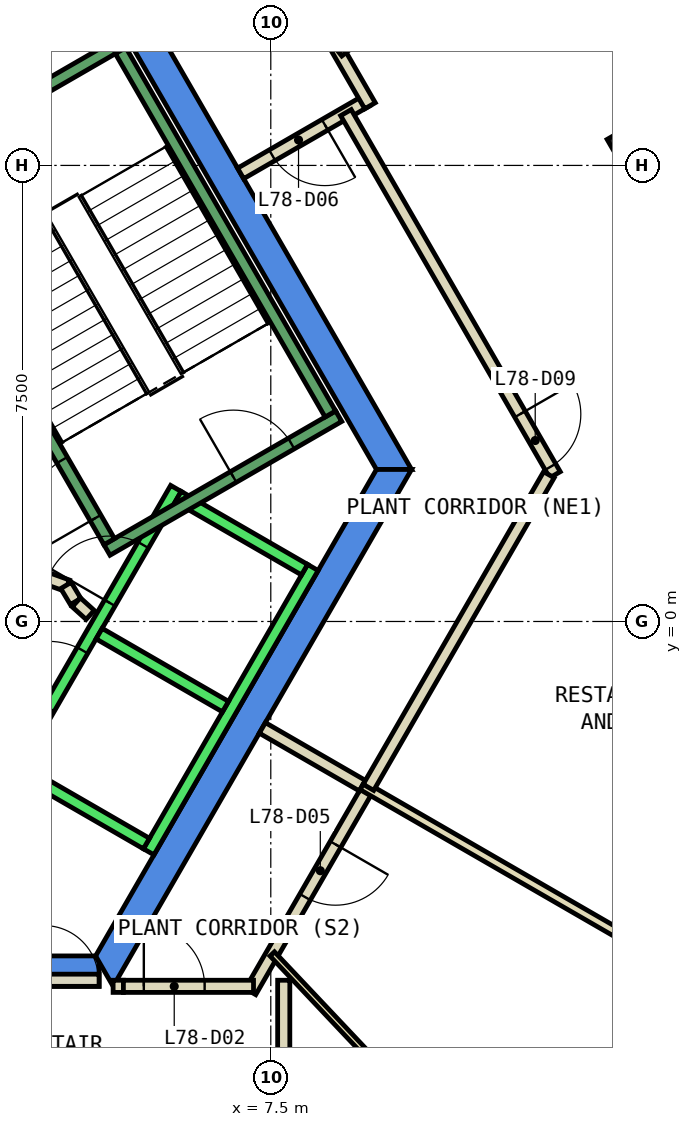
"""IFC4 building model, lengths in metres.
Left out: names, types, materials, properties, quantities, classifications, styles, units other than length and angle.
Written with IfcOpenShell. Run it as: python <this file> out.ifc"""

import sys

from ifc_helpers import new_model, si_unit, direction, frame, frame_2d, origin, origin_2d, place, context, subcontext, project, spatial, polyline, rectangle, outline, extrude, element, fill, save


model = new_model("IFC4")
c1 = context("Model", 3, precision=1e-05, world=origin(), true_north=direction((0.0, 1.0)))
c2 = subcontext(c1, "Body", "Model", "MODEL_VIEW")
j1 = project(units=[si_unit("LENGTHUNIT", "METRE"), si_unit("PLANEANGLEUNIT", "RADIAN")], contexts=[c1])
p1 = place(None, origin())
s1 = spatial("IfcSite", under=j1, at=p1, CompositionType="ELEMENT")
p2 = place(p1, origin())
s2 = spatial("IfcBuilding", under=s1, at=p2, CompositionType="ELEMENT")
p3 = place(p2, frame((0.0, 0.0, 331.4)))
s3 = spatial("IfcBuildingStorey", under=s2, at=p3, CompositionType="ELEMENT", Elevation=331.4)
p4 = place(p3, frame((13.51, 7.8, 0.0), z_axis=(0.0, 0.0, 1.0), x_axis=(-0.5, 0.866025403784, 0.0)))
e1 = element("IfcColumn", 1, at=p4, inside=s3, PredefinedType="COLUMN", context=c2, shape_type="SweptSolid", body=[
    extrude(rectangle(XDim=0.7, YDim=0.7, at=origin_2d()), origin(), (0.0, 0.0, 1.0), 4.15),
])
p5 = place(p3, frame((0.0, 0.0, -0.45)))
e2 = element("IfcWall", 2, at=p5, inside=s3, PredefinedType="SHEAR", context=c2, shape_type="SweptSolid", body=[
    extrude(outline(polyline([(5.486, 9.998), (5.053, 9.748), (9.238, 2.5), (9.815, 2.5), (5.486, 9.998)])), origin(), (0.0, 0.0, 1.0), 4.6),
])
p6 = place(p3, frame((0.0, 0.0, 3.6)))
e3 = element("IfcWall", 3, at=p6, inside=s3, PredefinedType="SHEAR", context=c2, shape_type="SweptSolid", body=[
    extrude(outline(polyline([(4.676, -6.0), (4.676, -5.6), (4.619, -5.5), (3.75, -5.5), (3.75, -6.0), (4.676, -6.0)])), origin(), (0.0, 0.0, 1.0), 0.55),
])
p7 = place(p3, frame((0.0, 0.0, -0.45)))
e4 = element("IfcWall", 4, at=p7, inside=s3, PredefinedType="SHEAR", context=c2, shape_type="SweptSolid", body=[
    extrude(outline(polyline([(4.907, -6.0), (9.815, 2.5), (9.238, 2.5), (4.619, -5.5), (4.907, -6.0)])), origin(), (0.0, 0.0, 1.0), 4.6),
])
p8 = place(p3, frame((13.905, 8.604, 0.0), z_axis=(0.0, 0.0, 1.0), x_axis=(-0.509697735304, 0.86035354281, 0.0)))
e5 = element("IfcWall", 5, at=p8, inside=s3, PredefinedType="STANDARD", context=c2, shape_type="SweptSolid", body=[
    extrude(rectangle(XDim=7.098, YDim=0.3, at=frame_2d((3.549, 0.0))), origin(), (0.0, 0.0, 1.0), 4.15),
])
p9 = place(p8, frame((0.575, 0.0, 0.9)))
e6 = element("IfcOpeningElement", 6, at=p9, cuts=e5, PredefinedType="OPENING", context=c2, shape_type="SweptSolid", body=[
    extrude(rectangle(XDim=2.4, YDim=3.0, at=frame_2d((1.2, 1.5))), frame((0.0, 0.16, 0.0), z_axis=(0.0, -1.0, 0.0), x_axis=(1.0, 0.0, 0.0)), (0.0, 0.0, 1.0), 0.32),
])
p10 = place(p8, frame((4.124, 0.0, 0.9)))
e7 = element("IfcOpeningElement", 7, at=p10, cuts=e5, PredefinedType="OPENING", context=c2, shape_type="SweptSolid", body=[
    extrude(rectangle(XDim=2.4, YDim=3.0, at=frame_2d((1.2, 1.5))), frame((0.0, 0.16, 0.0), z_axis=(0.0, -1.0, 0.0), x_axis=(1.0, 0.0, 0.0)), (0.0, 0.0, 1.0), 0.32),
])
p11 = place(p3, frame((3.838, 0.702, 0.0), z_axis=(0.0, 0.0, 1.0), x_axis=(0.941035081519, -0.338308993895, 0.0)))
e8 = element("IfcWall", 8, at=p11, inside=s3, PredefinedType="PARTITIONING", context=c2, shape_type="SweptSolid", body=[
    extrude(rectangle(XDim=0.337, YDim=0.2, at=frame_2d((0.168, 0.0))), origin(), (0.0, 0.0, 1.0), 4.15),
])
p12 = place(p3, frame((4.132, 0.593, 0.0), z_axis=(0.0, 0.0, 1.0), x_axis=(0.513561617048, -0.858052717201, 0.0)))
e9 = element("IfcWall", 9, at=p12, inside=s3, PredefinedType="PARTITIONING", context=c2, shape_type="SweptSolid", body=[
    extrude(rectangle(XDim=0.308, YDim=0.2, at=frame_2d((0.154, 0.0))), origin(), (0.0, 0.0, 1.0), 4.15),
])
p13 = place(p3, frame((4.301, 0.315, 0.0), z_axis=(0.0, 0.0, 1.0), x_axis=(0.741798017506, -0.670623367639, 0.0)))
e10 = element("IfcWall", 10, at=p13, inside=s3, PredefinedType="PARTITIONING", context=c2, shape_type="SweptSolid", body=[
    extrude(rectangle(XDim=0.309, YDim=0.2, at=frame_2d((0.154, 0.0))), origin(), (0.0, 0.0, 1.0), 4.15),
])
p14 = place(p3, frame((4.907, -6.0, 0.0), z_axis=(0.0, 0.0, 1.0), x_axis=(1.0, 0.0, 0.0)))
e11 = element("IfcWall", 11, at=p14, inside=s3, PredefinedType="PARTITIONING", context=c2, shape_type="SweptSolid", body=[
    extrude(rectangle(XDim=0.169, YDim=0.2, at=frame_2d((0.084, 0.0))), origin(), (0.0, 0.0, 1.0), 2.4),
])
p15 = place(p3, frame((7.713, -5.9, 0.0), z_axis=(0.0, 0.0, 1.0), x_axis=(0.0, -1.0, 0.0)))
e12 = element("IfcWall", 12, at=p15, inside=s3, PredefinedType="PARTITIONING", context=c2, shape_type="SweptSolid", body=[
    extrude(rectangle(XDim=2.4, YDim=0.2, at=frame_2d((1.2, 0.0))), origin(), (0.0, 0.0, 1.0), 4.15),
])
p16 = place(p3, frame((9.106, -2.728, 0.0), z_axis=(0.0, 0.0, 1.0), x_axis=(-0.500132879116, -0.865948672398, 0.0)))
e13 = element("IfcWall", 13, at=p16, inside=s3, PredefinedType="PARTITIONING", context=c2, shape_type="SweptSolid", body=[
    extrude(rectangle(XDim=3.879, YDim=0.2, at=frame_2d((1.939, 0.0))), origin(), (0.0, 0.0, 1.0), 4.15),
])
p17 = place(p16, frame((1.083, 0.0, 0.0)))
e14 = element("IfcOpeningElement", 14, at=p17, cuts=e13, PredefinedType="OPENING", context=c2, shape_type="SweptSolid", body=[
    extrude(rectangle(XDim=1.0, YDim=2.1, at=frame_2d((0.5, 1.05))), frame((0.0, 0.11, 0.0), z_axis=(0.0, -1.0, 0.0), x_axis=(1.0, 0.0, 0.0)), (0.0, 0.0, 1.0), 0.22),
])
p18 = place(p3, frame((7.361, -1.75, 0.0), z_axis=(0.0, 0.0, 1.0), x_axis=(0.865980106173, -0.500078449558, 0.0)))
e15 = element("IfcWall", 15, at=p18, inside=s3, PredefinedType="PARTITIONING", context=c2, shape_type="SweptSolid", body=[
    extrude(rectangle(XDim=1.9, YDim=0.2, at=frame_2d((0.95, 0.0))), origin(), (0.0, 0.0, 1.0), 4.15),
])
p19 = place(p3, frame((7.524, -5.467, 0.0), z_axis=(0.0, 0.0, 1.0), x_axis=(0.686666158826, -0.726972892427, 0.0)))
e16 = element("IfcWall", 16, at=p19, inside=s3, PredefinedType="PARTITIONING", context=c2, shape_type="SweptSolid", body=[
    extrude(rectangle(XDim=13.622, YDim=0.1, at=frame_2d((6.811, 0.0))), origin(), (0.0, 0.0, 1.0), 4.15),
])
p20 = place(p3, frame((9.006, -2.7, 0.0), z_axis=(0.0, 0.0, 1.0), x_axis=(0.865999449672, -0.500044951147, 0.0)))
e17 = element("IfcWall", 17, at=p20, inside=s3, PredefinedType="PARTITIONING", context=c2, shape_type="SweptSolid", body=[
    extrude(rectangle(XDim=14.635, YDim=0.15, at=frame_2d((7.317, 0.0))), origin(), (0.0, 0.0, 1.0), 4.15),
])
p21 = place(p3, frame((9.082, 8.568, 0.0), z_axis=(0.0, 0.0, 1.0), x_axis=(-0.865955154139, -0.50012165622, 0.0)))
e18 = element("IfcWall", 18, at=p21, inside=s3, PredefinedType="PARTITIONING", context=c2, shape_type="SweptSolid", body=[
    extrude(rectangle(XDim=2.4, YDim=0.2, at=frame_2d((1.2, 0.0))), origin(), (0.0, 0.0, 1.0), 4.15),
])
p22 = place(p21, frame((0.8, 0.0, 0.0)))
e19 = element("IfcOpeningElement", 19, at=p22, cuts=e18, PredefinedType="OPENING", context=c2, shape_type="SweptSolid", body=[
    extrude(rectangle(XDim=1.0, YDim=2.1, at=frame_2d((0.5, 1.05))), frame((0.0, 0.11, 0.0), z_axis=(0.0, -1.0, 0.0), x_axis=(1.0, 0.0, 0.0)), (0.0, 0.0, 1.0), 0.22),
])
p23 = place(p3, frame((5.532, 14.717, 0.0), z_axis=(0.0, 0.0, 1.0), x_axis=(0.499968011863, -0.866043871356, 0.0)))
e20 = element("IfcWall", 20, at=p23, inside=s3, PredefinedType="PARTITIONING", context=c2, shape_type="SweptSolid", body=[
    extrude(rectangle(XDim=7.201, YDim=0.2, at=frame_2d((3.6, 0.0))), origin(), (0.0, 0.0, 1.0), 4.15),
])
p24 = place(p23, frame((2.68, 0.0, 0.0)))
e21 = element("IfcOpeningElement", 21, at=p24, cuts=e20, PredefinedType="OPENING", context=c2, shape_type="SweptSolid", body=[
    extrude(rectangle(XDim=1.0, YDim=2.1, at=frame_2d((0.5, 1.05))), frame((0.0, 0.11, 0.0), z_axis=(0.0, -1.0, 0.0), x_axis=(1.0, 0.0, 0.0)), (0.0, 0.0, 1.0), 0.22),
])
p25 = place(p3, frame((8.736, 8.368, 0.0), z_axis=(0.0, 0.0, 1.0), x_axis=(0.499995994493, -0.866027716353, 0.0)))
e22 = element("IfcWall", 22, at=p25, inside=s3, PredefinedType="PARTITIONING", context=c2, shape_type="SweptSolid", body=[
    extrude(rectangle(XDim=6.876, YDim=0.2, at=frame_2d((3.438, 0.0))), origin(), (0.0, 0.0, 1.0), 4.15),
])
p26 = place(p25, frame((5.726, 0.0, 0.0)))
e23 = element("IfcOpeningElement", 23, at=p26, cuts=e22, PredefinedType="OPENING", context=c2, shape_type="SweptSolid", body=[
    extrude(rectangle(XDim=1.0, YDim=2.1, at=frame_2d((0.5, 1.05))), frame((0.0, 0.11, 0.0), z_axis=(0.0, -1.0, 0.0), x_axis=(1.0, 0.0, 0.0)), (0.0, 0.0, 1.0), 0.22),
])
p27 = place(p3, frame((12.074, 2.413, 0.0), z_axis=(0.0, 0.0, 1.0), x_axis=(-0.499974029402, -0.866040397397, 0.0)))
e24 = element("IfcWall", 24, at=p27, inside=s3, PredefinedType="PARTITIONING", context=c2, shape_type="SweptSolid", body=[
    extrude(rectangle(XDim=5.936, YDim=0.2, at=frame_2d((2.968, 0.0))), origin(), (0.0, 0.0, 1.0), 4.15),
])
p28 = place(p3, frame((11.808, 11.849, 0.0), z_axis=(0.0, 0.0, 1.0), x_axis=(-0.784103353093, -0.620630269701, 0.0)))
e25 = element("IfcWall", 25, at=p28, inside=s3, PredefinedType="PARTITIONING", context=c2, shape_type="SweptSolid", body=[
    extrude(rectangle(XDim=4.044, YDim=0.1, at=frame_2d((2.022, 0.0))), origin(), (0.0, 0.0, 1.0), 4.15),
])
p29 = place(p3, frame((3.75, -5.9, 0.0), z_axis=(0.0, 0.0, 1.0), x_axis=(1.0, 0.0, 0.0)))
e26 = element("IfcWall", 26, at=p29, inside=s3, PredefinedType="PARTITIONING", context=c2, shape_type="SweptSolid", body=[
    extrude(rectangle(XDim=0.926, YDim=0.2, at=frame_2d((0.463, 0.0))), origin(), (0.0, 0.0, 1.0), 2.4),
])
p30 = place(p29, frame((0.017, 0.0, 0.0)))
e27 = element("IfcOpeningElement", 27, at=p30, cuts=e26, PredefinedType="OPENING", context=c2, shape_type="SweptSolid", body=[
    extrude(rectangle(XDim=0.9, YDim=2.1, at=frame_2d((0.45, 1.05))), frame((0.0, 0.11, 0.0), z_axis=(0.0, -1.0, 0.0), x_axis=(1.0, 0.0, 0.0)), (0.0, 0.0, 1.0), 0.22),
])
p31 = place(p3, frame((5.076, -6.0, 0.0), z_axis=(0.0, 0.0, 1.0), x_axis=(1.0, 0.0, 0.0)))
e28 = element("IfcWall", 28, at=p31, inside=s3, PredefinedType="PARTITIONING", context=c2, shape_type="SweptSolid", body=[
    extrude(rectangle(XDim=2.14, YDim=0.2, at=frame_2d((1.07, 0.0))), origin(), (0.0, 0.0, 1.0), 4.15),
])
p32 = place(p31, frame((0.336, 0.0, 0.0)))
e29 = element("IfcOpeningElement", 29, at=p32, cuts=e28, PredefinedType="OPENING", context=c2, shape_type="SweptSolid", body=[
    extrude(rectangle(XDim=1.0, YDim=2.1, at=frame_2d((0.5, 1.05))), frame((0.0, 0.11, 0.0), z_axis=(0.0, -1.0, 0.0), x_axis=(1.0, 0.0, 0.0)), (0.0, 0.0, 1.0), 0.22),
])
p33 = place(p3, frame((3.24, -2.488, 0.0), z_axis=(0.0, 0.0, 1.0), x_axis=(0.500034260056, 0.866005622828, 0.0)))
e30 = element("IfcWall", 30, at=p33, inside=s3, PredefinedType="STANDARD", context=c2, shape_type="SweptSolid", body=[
    extrude(rectangle(XDim=5.399, YDim=0.2, at=frame_2d((2.7, 0.0))), origin(), (0.0, 0.0, 1.0), 4.15),
])
p34 = place(p33, frame((3.225, 0.0, 0.0)))
e31 = element("IfcOpeningElement", 31, at=p34, cuts=e30, PredefinedType="OPENING", context=c2, shape_type="SweptSolid", body=[
    extrude(rectangle(XDim=1.1, YDim=2.1, at=frame_2d((0.55, 1.05))), frame((0.0, 0.11, 0.0), z_axis=(0.0, -1.0, 0.0), x_axis=(1.0, 0.0, 0.0)), (0.0, 0.0, 1.0), 0.22),
])
p35 = place(p33, frame((1.225, 0.0, 0.0)))
e32 = element("IfcOpeningElement", 32, at=p35, cuts=e30, PredefinedType="OPENING", context=c2, shape_type="SweptSolid", body=[
    extrude(rectangle(XDim=1.1, YDim=2.1, at=frame_2d((0.55, 1.05))), frame((0.0, 0.11, 0.0), z_axis=(0.0, -1.0, 0.0), x_axis=(1.0, 0.0, 0.0)), (0.0, 0.0, 1.0), 0.22),
])
p36 = place(p3, frame((5.492, -3.788, 0.0), z_axis=(0.0, 0.0, 1.0), x_axis=(0.500034260056, 0.866005622828, 0.0)))
e33 = element("IfcWall", 33, at=p36, inside=s3, PredefinedType="STANDARD", context=c2, shape_type="SweptSolid", body=[
    extrude(rectangle(XDim=5.399, YDim=0.2, at=frame_2d((2.7, 0.0))), origin(), (0.0, 0.0, 1.0), 4.15),
])
p37 = place(p3, frame((3.377, -2.452, 0.0), z_axis=(0.0, 0.0, 1.0), x_axis=(0.865955154139, -0.50012165622, 0.0)))
e34 = element("IfcWall", 34, at=p37, inside=s3, PredefinedType="STANDARD", context=c2, shape_type="SweptSolid", body=[
    extrude(rectangle(XDim=2.4, YDim=0.2, at=frame_2d((1.2, 0.0))), origin(), (0.0, 0.0, 1.0), 4.15),
])
for number, where, z_axis, x_axis in (
    (35, (4.677, -0.2, 0.0), (0.0, 0.0, 1.0), (0.866, -0.5, 0.0)),
    (36, (5.977, 2.052, 0.0), (0.0, 0.0, 1.0), (0.866, -0.5, 0.0)),
):
    element("IfcWall", number, at=place(p3, frame(where, z_axis=z_axis, x_axis=x_axis)), inside=s3, PredefinedType="STANDARD", context=c2, shape_type="SweptSolid", body=[
        extrude(rectangle(XDim=2.399, YDim=0.2, at=frame_2d((1.2, 0.0))), origin(), (0.0, 0.0, 1.0), 4.15),
    ])
p38 = place(p3, frame((4.806, 1.176, 0.0), z_axis=(0.0, 0.0, 1.0), x_axis=(0.866059941101, 0.499940174841, 0.0)))
e37 = element("IfcWall", 37, at=p38, inside=s3, PredefinedType="STANDARD", context=c2, shape_type="SweptSolid", body=[
    extrude(rectangle(XDim=4.4, YDim=0.2, at=frame_2d((2.2, 0.0))), origin(), (0.0, 0.0, 1.0), 4.15),
])
p39 = place(p38, frame((2.4, 0.0, 0.0)))
e38 = element("IfcOpeningElement", 38, at=p39, cuts=e37, PredefinedType="OPENING", context=c2, shape_type="SweptSolid", body=[
    extrude(rectangle(XDim=1.1, YDim=2.2, at=frame_2d((0.55, 1.1))), frame((0.0, 0.11, 0.0), z_axis=(0.0, -1.0, 0.0), x_axis=(1.0, 0.0, 0.0)), (0.0, 0.0, 1.0), 0.22),
])
p40 = place(p3, frame((2.7, 8.158, 0.0), z_axis=(0.0, 0.0, 1.0), x_axis=(0.86611865017, 0.499838457731, 0.0)))
e39 = element("IfcWall", 39, at=p40, inside=s3, PredefinedType="STANDARD", context=c2, shape_type="SweptSolid", body=[
    extrude(rectangle(XDim=2.733, YDim=0.2, at=frame_2d((1.366, 0.0))), origin(), (0.0, 0.0, 1.0), 4.15),
])
p41 = place(p3, frame((4.843, 1.312, 0.0), z_axis=(0.0, 0.0, 1.0), x_axis=(-0.499963383562, 0.866046543262, 0.0)))
e40 = element("IfcWall", 40, at=p41, inside=s3, PredefinedType="STANDARD", context=c2, shape_type="SweptSolid", body=[
    extrude(rectangle(XDim=6.9, YDim=0.2, at=frame_2d((3.45, 0.0))), origin(), (0.0, 0.0, 1.0), 4.15),
])
p42 = place(p41, frame((0.45, 0.0, 0.0)))
e41 = element("IfcOpeningElement", 41, at=p42, cuts=e40, PredefinedType="OPENING", context=c2, shape_type="SweptSolid", body=[
    extrude(rectangle(XDim=1.1, YDim=2.2, at=frame_2d((0.55, 1.1))), frame((0.0, 0.11, 0.0), z_axis=(0.0, -1.0, 0.0), x_axis=(1.0, 0.0, 0.0)), (0.0, 0.0, 1.0), 0.22),
])
p43 = place(p3, frame((8.48, 3.412, 0.0), z_axis=(0.0, 0.0, 1.0), x_axis=(-0.499978703459, 0.866037698999, 0.0)))
e42 = element("IfcWall", 42, at=p43, inside=s3, PredefinedType="STANDARD", context=c2, shape_type="SweptSolid", body=[
    extrude(rectangle(XDim=6.9, YDim=0.2, at=frame_2d((3.45, 0.0))), origin(), (0.0, 0.0, 1.0), 4.15),
])
p44 = place(p9, origin())
e43 = element("IfcWindow", 43, at=p44, inside=s3, PartitioningType="SINGLE_PANEL", PredefinedType="WINDOW", context=c2, shape_type="SweptSolid", body=[
    extrude(rectangle(XDim=2.4, YDim=3.0, at=frame_2d((1.2, 1.5))), frame((0.0, 0.03, 0.0), z_axis=(0.0, -1.0, 0.0), x_axis=(1.0, 0.0, 0.0)), (0.0, 0.0, 1.0), 0.06),
])
fill(e6, e43)
p45 = place(p32, origin())
e44 = element("IfcDoor", 44, at=p45, inside=s3, OperationType="SINGLE_SWING_RIGHT", PredefinedType="DOOR", context=c2, shape_type="SweptSolid", body=[
    extrude(rectangle(XDim=1.0, YDim=2.1, at=frame_2d((0.5, 1.05))), frame((0.0, 0.025, 0.0), z_axis=(0.0, -1.0, 0.0), x_axis=(1.0, 0.0, 0.0)), (0.0, 0.0, 1.0), 0.05),
])
fill(e29, e44)
p46 = place(p17, origin())
e45 = element("IfcDoor", 45, at=p46, inside=s3, OperationType="SINGLE_SWING_LEFT", PredefinedType="DOOR", context=c2, shape_type="SweptSolid", body=[
    extrude(rectangle(XDim=1.0, YDim=2.1, at=frame_2d((0.5, 1.05))), frame((0.0, 0.025, 0.0), z_axis=(0.0, -1.0, 0.0), x_axis=(1.0, 0.0, 0.0)), (0.0, 0.0, 1.0), 0.05),
])
fill(e14, e45)
p47 = place(p22, origin())
e46 = element("IfcDoor", 46, at=p47, inside=s3, OperationType="SINGLE_SWING_LEFT", PredefinedType="DOOR", context=c2, shape_type="SweptSolid", body=[
    extrude(rectangle(XDim=1.0, YDim=2.1, at=frame_2d((0.5, 1.05))), frame((0.0, 0.025, 0.0), z_axis=(0.0, -1.0, 0.0), x_axis=(1.0, 0.0, 0.0)), (0.0, 0.0, 1.0), 0.05),
])
fill(e19, e46)
p48 = place(p26, origin())
e47 = element("IfcDoor", 47, at=p48, inside=s3, OperationType="SINGLE_SWING_RIGHT", PredefinedType="DOOR", context=c2, shape_type="SweptSolid", body=[
    extrude(rectangle(XDim=1.0, YDim=2.1, at=frame_2d((0.5, 1.05))), frame((0.0, 0.025, 0.0), z_axis=(0.0, -1.0, 0.0), x_axis=(1.0, 0.0, 0.0)), (0.0, 0.0, 1.0), 0.05),
])
fill(e23, e47)
p49 = place(p30, origin())
e48 = element("IfcDoor", 48, at=p49, inside=s3, OperationType="SINGLE_SWING_LEFT", PredefinedType="DOOR", context=c2, shape_type="SweptSolid", body=[
    extrude(rectangle(XDim=0.9, YDim=2.1, at=frame_2d((0.45, 1.05))), frame((0.0, 0.025, 0.0), z_axis=(0.0, -1.0, 0.0), x_axis=(1.0, 0.0, 0.0)), (0.0, 0.0, 1.0), 0.05),
])
fill(e27, e48)
p50 = place(p34, origin())
e49 = element("IfcDoor", 49, at=p50, inside=s3, OperationType="SLIDING_TO_LEFT", PredefinedType="DOOR", context=c2, shape_type="SweptSolid", body=[
    extrude(rectangle(XDim=1.1, YDim=2.1, at=frame_2d((0.55, 1.05))), frame((0.0, 0.025, 0.0), z_axis=(0.0, -1.0, 0.0), x_axis=(1.0, 0.0, 0.0)), (0.0, 0.0, 1.0), 0.05),
])
fill(e31, e49)
p51 = place(p35, origin())
e50 = element("IfcDoor", 50, at=p51, inside=s3, OperationType="SLIDING_TO_LEFT", PredefinedType="DOOR", context=c2, shape_type="SweptSolid", body=[
    extrude(rectangle(XDim=1.1, YDim=2.1, at=frame_2d((0.55, 1.05))), frame((0.0, 0.025, 0.0), z_axis=(0.0, -1.0, 0.0), x_axis=(1.0, 0.0, 0.0)), (0.0, 0.0, 1.0), 0.05),
])
fill(e32, e50)
p52 = place(p42, origin())
e51 = element("IfcDoor", 51, at=p52, inside=s3, OperationType="SINGLE_SWING_LEFT", PredefinedType="DOOR", context=c2, shape_type="SweptSolid", body=[
    extrude(rectangle(XDim=1.1, YDim=2.2, at=frame_2d((0.55, 1.1))), frame((0.0, 0.025, 0.0), z_axis=(0.0, -1.0, 0.0), x_axis=(1.0, 0.0, 0.0)), (0.0, 0.0, 1.0), 0.05),
])
fill(e41, e51)
p53 = place(p39, origin())
e52 = element("IfcDoor", 52, at=p53, inside=s3, OperationType="SINGLE_SWING_LEFT", PredefinedType="DOOR", context=c2, shape_type="SweptSolid", body=[
    extrude(rectangle(XDim=1.1, YDim=2.2, at=frame_2d((0.55, 1.1))), frame((0.0, 0.025, 0.0), z_axis=(0.0, -1.0, 0.0), x_axis=(1.0, 0.0, 0.0)), (0.0, 0.0, 1.0), 0.05),
])
fill(e38, e52)
save(model, sys.argv[1])
